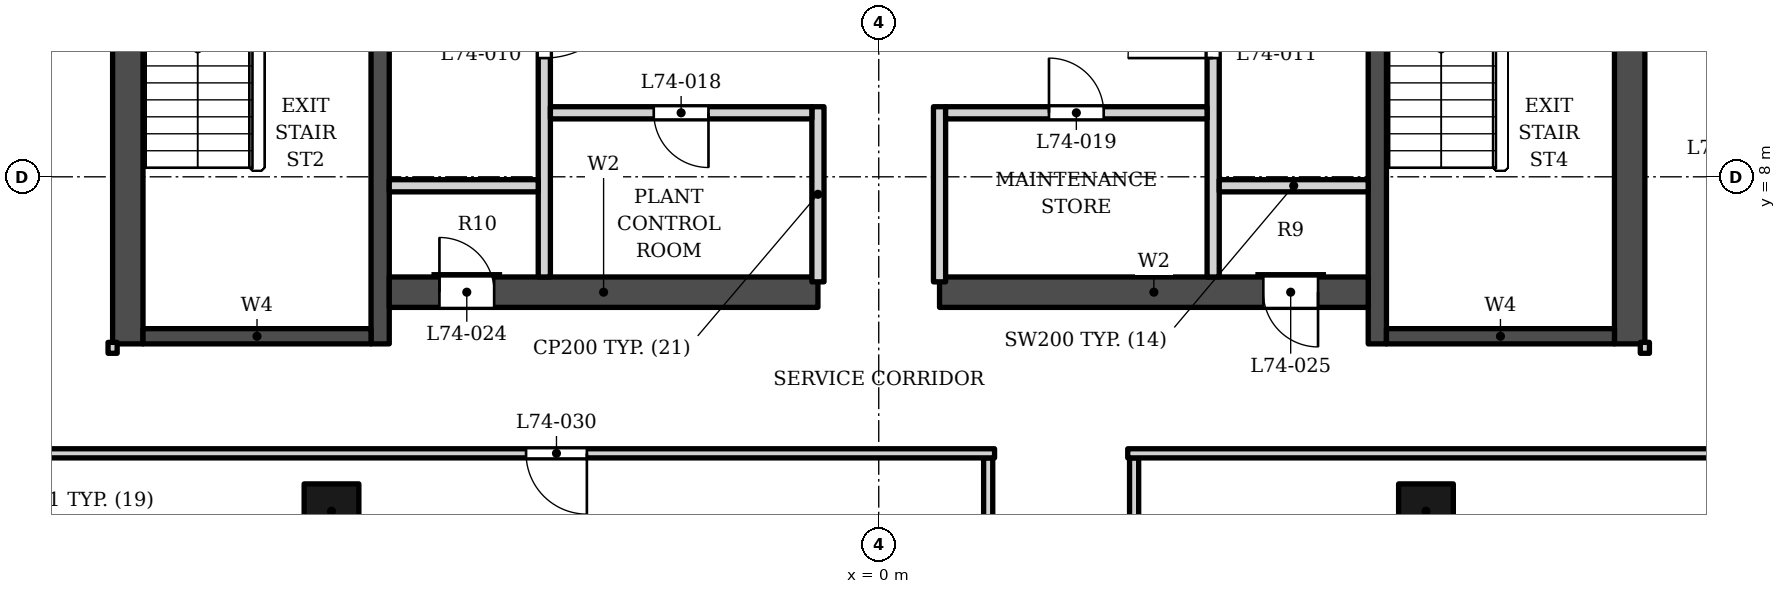
"""IFC4 building model, lengths in metres.
Left out: names, types, materials, properties, quantities, classifications, styles, units other than length and angle.
Written with IfcOpenShell. Run it as: python <this file> out.ifc"""

import sys

from ifc_helpers import new_model, si_unit, direction, frame, frame_2d, origin, origin_2d, place, context, subcontext, project, spatial, rectangle, extrude, element, fill, save


model = new_model("IFC4")
c1 = context("Model", 3, precision=1e-05, world=origin(), true_north=direction((0.0, 1.0)))
c2 = subcontext(c1, "Body", "Model", "MODEL_VIEW")
j1 = project(units=[si_unit("LENGTHUNIT", "METRE"), si_unit("PLANEANGLEUNIT", "RADIAN")], contexts=[c1])
p1 = place(None, origin())
s1 = spatial("IfcSite", under=j1, at=p1, CompositionType="ELEMENT")
p2 = place(p1, origin())
s2 = spatial("IfcBuilding", under=s1, at=p2, CompositionType="ELEMENT")
p3 = place(p2, frame((0.0, 0.0, 315.5)))
s3 = spatial("IfcBuildingStorey", under=s2, at=p3, CompositionType="ELEMENT", Elevation=315.5)
p4 = place(p3, frame((-12.35, 5.253, 0.0), z_axis=(0.0, 0.0, 1.0), x_axis=(0.0, 1.0, 0.0)))
e1 = element("IfcWall", 1, at=p4, inside=s3, PredefinedType="SHEAR", context=c2, shape_type="SweptSolid", body=[
    extrude(rectangle(XDim=13.8, YDim=0.5, at=frame_2d((6.9, 0.0))), origin(), (0.0, 0.0, 1.0), 5.0),
])
p5 = place(p4, frame((7.2, 0.0, 0.0)))
e2 = element("IfcOpeningElement", 2, at=p5, cuts=e1, PredefinedType="OPENING", context=c2, shape_type="SweptSolid", body=[
    extrude(rectangle(XDim=1.2, YDim=2.1, at=frame_2d((0.6, 1.05))), frame((0.0, 0.26, 0.0), z_axis=(0.0, -1.0, 0.0), x_axis=(1.0, 0.0, 0.0)), (0.0, 0.0, 1.0), 0.52),
])
p6 = place(p4, frame((5.15, 0.0, 0.0)))
e3 = element("IfcOpeningElement", 3, at=p6, cuts=e1, PredefinedType="OPENING", context=c2, shape_type="SweptSolid", body=[
    extrude(rectangle(XDim=1.2, YDim=2.1, at=frame_2d((0.6, 1.05))), frame((0.0, 0.26, 0.0), z_axis=(0.0, -1.0, 0.0), x_axis=(1.0, 0.0, 0.0)), (0.0, 0.0, 1.0), 0.52),
])
p7 = place(p3, frame((-8.2, 5.253, 0.0), z_axis=(0.0, 0.0, 1.0), x_axis=(0.0, 1.0, 0.0)))
e4 = element("IfcWall", 4, at=p7, inside=s3, PredefinedType="SHEAR", context=c2, shape_type="SweptSolid", body=[
    extrude(rectangle(XDim=13.3, YDim=0.3, at=frame_2d((6.65, 0.0))), origin(), (0.0, 0.0, 1.0), 5.0),
])
p8 = place(p7, frame((7.1, 0.0, 0.0)))
e5 = element("IfcOpeningElement", 5, at=p8, cuts=e4, PredefinedType="OPENING", context=c2, shape_type="SweptSolid", body=[
    extrude(rectangle(XDim=1.4, YDim=2.1, at=frame_2d((0.7, 1.05))), frame((0.0, 0.16, 0.0), z_axis=(0.0, -1.0, 0.0), x_axis=(1.0, 0.0, 0.0)), (0.0, 0.0, 1.0), 0.32),
])
p9 = place(p7, frame((5.05, 0.0, 0.0)))
e6 = element("IfcOpeningElement", 6, at=p9, cuts=e4, PredefinedType="OPENING", context=c2, shape_type="SweptSolid", body=[
    extrude(rectangle(XDim=1.4, YDim=2.1, at=frame_2d((0.7, 1.05))), frame((0.0, 0.16, 0.0), z_axis=(0.0, -1.0, 0.0), x_axis=(1.0, 0.0, 0.0)), (0.0, 0.0, 1.0), 0.32),
])
p10 = place(p3, frame((-12.1, 5.378, 0.0), z_axis=(0.0, 0.0, 1.0), x_axis=(1.0, 0.0, 0.0)))
e7 = element("IfcWall", 7, at=p10, inside=s3, PredefinedType="SHEAR", context=c2, shape_type="SweptSolid", body=[
    extrude(rectangle(XDim=3.75, YDim=0.25, at=frame_2d((1.875, 0.0))), origin(), (0.0, 0.0, 1.0), 5.0),
])
p11 = place(p3, frame((12.35, 5.253, 0.0), z_axis=(0.0, 0.0, 1.0), x_axis=(0.0, 1.0, 0.0)))
e8 = element("IfcWall", 8, at=p11, inside=s3, PredefinedType="SHEAR", context=c2, shape_type="SweptSolid", body=[
    extrude(rectangle(XDim=13.8, YDim=0.5, at=frame_2d((6.9, 0.0))), origin(), (0.0, 0.0, 1.0), 5.0),
])
p12 = place(p11, frame((7.2, 0.0, 0.0)))
e9 = element("IfcOpeningElement", 9, at=p12, cuts=e8, PredefinedType="OPENING", context=c2, shape_type="SweptSolid", body=[
    extrude(rectangle(XDim=1.2, YDim=2.1, at=frame_2d((0.6, 1.05))), frame((0.0, 0.26, 0.0), z_axis=(0.0, -1.0, 0.0), x_axis=(1.0, 0.0, 0.0)), (0.0, 0.0, 1.0), 0.52),
])
p13 = place(p11, frame((5.15, 0.0, 0.0)))
e10 = element("IfcOpeningElement", 10, at=p13, cuts=e8, PredefinedType="OPENING", context=c2, shape_type="SweptSolid", body=[
    extrude(rectangle(XDim=1.2, YDim=2.1, at=frame_2d((0.6, 1.05))), frame((0.0, 0.26, 0.0), z_axis=(0.0, -1.0, 0.0), x_axis=(1.0, 0.0, 0.0)), (0.0, 0.0, 1.0), 0.52),
])
p14 = place(p3, frame((8.2, 5.253, 0.0), z_axis=(0.0, 0.0, 1.0), x_axis=(0.0, 1.0, 0.0)))
e11 = element("IfcWall", 11, at=p14, inside=s3, PredefinedType="SHEAR", context=c2, shape_type="SweptSolid", body=[
    extrude(rectangle(XDim=13.3, YDim=0.3, at=frame_2d((6.65, 0.0))), origin(), (0.0, 0.0, 1.0), 5.0),
])
p15 = place(p14, frame((7.1, 0.0, 0.0)))
e12 = element("IfcOpeningElement", 12, at=p15, cuts=e11, PredefinedType="OPENING", context=c2, shape_type="SweptSolid", body=[
    extrude(rectangle(XDim=1.4, YDim=2.1, at=frame_2d((0.7, 1.05))), frame((0.0, 0.16, 0.0), z_axis=(0.0, -1.0, 0.0), x_axis=(1.0, 0.0, 0.0)), (0.0, 0.0, 1.0), 0.32),
])
p16 = place(p14, frame((5.05, 0.0, 0.0)))
e13 = element("IfcOpeningElement", 13, at=p16, cuts=e11, PredefinedType="OPENING", context=c2, shape_type="SweptSolid", body=[
    extrude(rectangle(XDim=1.4, YDim=2.1, at=frame_2d((0.7, 1.05))), frame((0.0, 0.16, 0.0), z_axis=(0.0, -1.0, 0.0), x_axis=(1.0, 0.0, 0.0)), (0.0, 0.0, 1.0), 0.32),
])
p17 = place(p3, frame((8.35, 5.378, 0.0), z_axis=(0.0, 0.0, 1.0), x_axis=(1.0, 0.0, 0.0)))
e14 = element("IfcWall", 14, at=p17, inside=s3, PredefinedType="SHEAR", context=c2, shape_type="SweptSolid", body=[
    extrude(rectangle(XDim=3.75, YDim=0.25, at=frame_2d((1.875, 0.0))), origin(), (0.0, 0.0, 1.0), 5.0),
])
p18 = place(p3, frame((-8.05, 6.103, 0.0), z_axis=(0.0, 0.0, 1.0), x_axis=(1.0, 0.0, 0.0)))
e15 = element("IfcWall", 15, at=p18, inside=s3, PredefinedType="SHEAR", context=c2, shape_type="SweptSolid", body=[
    extrude(rectangle(XDim=7.05, YDim=0.5, at=frame_2d((3.525, 0.0))), origin(), (0.0, 0.0, 1.0), 5.0),
])
p19 = place(p18, frame((0.825, 0.0, 0.0)))
e16 = element("IfcOpeningElement", 16, at=p19, cuts=e15, PredefinedType="OPENING", context=c2, shape_type="SweptSolid", body=[
    extrude(rectangle(XDim=0.9, YDim=2.1, at=frame_2d((0.45, 1.05))), frame((0.0, 0.26, 0.0), z_axis=(0.0, -1.0, 0.0), x_axis=(1.0, 0.0, 0.0)), (0.0, 0.0, 1.0), 0.52),
])
p20 = place(p3, frame((1.0, 6.103, 0.0), z_axis=(0.0, 0.0, 1.0), x_axis=(1.0, 0.0, 0.0)))
e17 = element("IfcWall", 17, at=p20, inside=s3, PredefinedType="SHEAR", context=c2, shape_type="SweptSolid", body=[
    extrude(rectangle(XDim=7.05, YDim=0.5, at=frame_2d((3.525, 0.0))), origin(), (0.0, 0.0, 1.0), 5.0),
])
p21 = place(p20, frame((5.325, 0.0, 0.0)))
e18 = element("IfcOpeningElement", 18, at=p21, cuts=e17, PredefinedType="OPENING", context=c2, shape_type="SweptSolid", body=[
    extrude(rectangle(XDim=0.9, YDim=2.1, at=frame_2d((0.45, 1.05))), frame((0.0, 0.26, 0.0), z_axis=(0.0, -1.0, 0.0), x_axis=(1.0, 0.0, 0.0)), (0.0, 0.0, 1.0), 0.52),
])
for number, where, z_axis, x_axis in (
    (19, (-9.0, 2.5, 0.0), (0.0, 0.0, 1.0), (1.0, 0.0, 0.0)),
    (20, (9.0, 2.5, 0.0), (0.0, 0.0, 1.0), (1.0, 0.0, 0.0)),
):
    element("IfcColumn", number, at=place(p3, frame(where, z_axis=z_axis, x_axis=x_axis)), inside=s3, PredefinedType="COLUMN", context=c2, shape_type="SweptSolid", body=[
        extrude(rectangle(XDim=0.9, YDim=0.9, at=origin_2d()), origin(), (0.0, 0.0, 1.0), 5.0),
    ])
for number, where, z_axis, x_axis in (
    (21, (-1.0, 6.273, 0.0), (0.0, 0.0, 1.0), (0.0, 1.0, 0.0)),
    (22, (1.0, 6.273, 0.0), (0.0, 0.0, 1.0), (0.0, 1.0, 0.0)),
):
    element("IfcWall", number, at=place(p3, frame(where, z_axis=z_axis, x_axis=x_axis)), inside=s3, PredefinedType="PARTITIONING", context=c2, shape_type="SweptSolid", body=[
        extrude(rectangle(XDim=2.88, YDim=0.2, at=frame_2d((1.44, 0.0))), origin(), (0.0, 0.0, 1.0), 4.8),
    ])
p22 = place(p3, frame((-5.5, 6.353, 0.0), z_axis=(0.0, 0.0, 1.0), x_axis=(0.0, 1.0, 0.0)))
e23 = element("IfcWall", 23, at=p22, inside=s3, PredefinedType="SOLIDWALL", context=c2, shape_type="SweptSolid", body=[
    extrude(rectangle(XDim=7.85, YDim=0.2, at=frame_2d((3.925, 0.0))), origin(), (0.0, 0.0, 1.0), 4.8),
])
p23 = place(p22, frame((3.6, 0.0, 0.0)))
e24 = element("IfcOpeningElement", 24, at=p23, cuts=e23, PredefinedType="OPENING", context=c2, shape_type="SweptSolid", body=[
    extrude(rectangle(XDim=1.4, YDim=2.1, at=frame_2d((0.7, 1.05))), frame((0.0, 0.11, 0.0), z_axis=(0.0, -1.0, 0.0), x_axis=(1.0, 0.0, 0.0)), (0.0, 0.0, 1.0), 0.22),
])
p24 = place(p3, frame((5.5, 6.353, 0.0), z_axis=(0.0, 0.0, 1.0), x_axis=(0.0, 1.0, 0.0)))
e25 = element("IfcWall", 25, at=p24, inside=s3, PredefinedType="SOLIDWALL", context=c2, shape_type="SweptSolid", body=[
    extrude(rectangle(XDim=7.85, YDim=0.2, at=frame_2d((3.925, 0.0))), origin(), (0.0, 0.0, 1.0), 4.8),
])
p25 = place(p24, frame((3.6, 0.0, 0.0)))
e26 = element("IfcOpeningElement", 26, at=p25, cuts=e25, PredefinedType="OPENING", context=c2, shape_type="SweptSolid", body=[
    extrude(rectangle(XDim=1.4, YDim=2.1, at=frame_2d((0.7, 1.05))), frame((0.0, 0.11, 0.0), z_axis=(0.0, -1.0, 0.0), x_axis=(1.0, 0.0, 0.0)), (0.0, 0.0, 1.0), 0.22),
])
for number, where, z_axis, x_axis in (
    (27, (-8.05, 7.853, 0.0), (0.0, 0.0, 1.0), (1.0, 0.0, 0.0)),
    (28, (5.6, 7.853, 0.0), (0.0, 0.0, 1.0), (1.0, 0.0, 0.0)),
):
    element("IfcWall", number, at=place(p3, frame(where, z_axis=z_axis, x_axis=x_axis)), inside=s3, PredefinedType="SOLIDWALL", context=c2, shape_type="SweptSolid", body=[
        extrude(rectangle(XDim=2.45, YDim=0.2, at=frame_2d((1.225, 0.0))), origin(), (0.0, 0.0, 1.0), 4.8),
    ])
p26 = place(p3, frame((-5.4, 9.052, 0.0), z_axis=(0.0, 0.0, 1.0), x_axis=(1.0, 0.0, 0.0)))
e29 = element("IfcWall", 29, at=p26, inside=s3, PredefinedType="PARTITIONING", context=c2, shape_type="SweptSolid", body=[
    extrude(rectangle(XDim=4.3, YDim=0.2, at=frame_2d((2.15, 0.0))), origin(), (0.0, 0.0, 1.0), 4.8),
])
p27 = place(p26, frame((1.7, 0.0, 0.0)))
e30 = element("IfcOpeningElement", 30, at=p27, cuts=e29, PredefinedType="OPENING", context=c2, shape_type="SweptSolid", body=[
    extrude(rectangle(XDim=0.9, YDim=2.1, at=frame_2d((0.45, 1.05))), frame((0.0, 0.11, 0.0), z_axis=(0.0, -1.0, 0.0), x_axis=(1.0, 0.0, 0.0)), (0.0, 0.0, 1.0), 0.22),
])
p28 = place(p3, frame((1.1, 9.052, 0.0), z_axis=(0.0, 0.0, 1.0), x_axis=(1.0, 0.0, 0.0)))
e31 = element("IfcWall", 31, at=p28, inside=s3, PredefinedType="PARTITIONING", context=c2, shape_type="SweptSolid", body=[
    extrude(rectangle(XDim=4.3, YDim=0.2, at=frame_2d((2.15, 0.0))), origin(), (0.0, 0.0, 1.0), 4.8),
])
p29 = place(p28, frame((1.7, 0.0, 0.0)))
e32 = element("IfcOpeningElement", 32, at=p29, cuts=e31, PredefinedType="OPENING", context=c2, shape_type="SweptSolid", body=[
    extrude(rectangle(XDim=0.9, YDim=2.1, at=frame_2d((0.45, 1.05))), frame((0.0, 0.11, 0.0), z_axis=(0.0, -1.0, 0.0), x_axis=(1.0, 0.0, 0.0)), (0.0, 0.0, 1.0), 0.22),
])
p30 = place(p3, frame((1.8, -6.472, 0.0), z_axis=(0.0, 0.0, 1.0), x_axis=(0.0, 1.0, 0.0)))
e33 = element("IfcWall", 33, at=p30, inside=s3, PredefinedType="PARTITIONING", context=c2, shape_type="SweptSolid", body=[
    extrude(rectangle(XDim=9.85, YDim=0.15, at=frame_2d((4.925, 0.0))), origin(), (0.0, 0.0, 1.0), 4.8),
])
p31 = place(p3, frame((4.2, -6.472, 0.0), z_axis=(0.0, 0.0, 1.0), x_axis=(0.0, 1.0, 0.0)))
e34 = element("IfcWall", 34, at=p31, inside=s3, PredefinedType="PARTITIONING", context=c2, shape_type="SweptSolid", body=[
    extrude(rectangle(XDim=9.85, YDim=0.15, at=frame_2d((4.925, 0.0))), origin(), (0.0, 0.0, 1.0), 4.8),
])
p32 = place(p31, frame((4.325, 0.0, 0.0)))
e35 = element("IfcOpeningElement", 35, at=p32, cuts=e34, PredefinedType="OPENING", context=c2, shape_type="SweptSolid", body=[
    extrude(rectangle(XDim=1.0, YDim=2.1, at=frame_2d((0.5, 1.05))), frame((0.0, 0.085, 0.0), z_axis=(0.0, -1.0, 0.0), x_axis=(1.0, 0.0, 0.0)), (0.0, 0.0, 1.0), 0.17),
])
p33 = place(p3, frame((-15.85, 3.453, 0.0), z_axis=(0.0, 0.0, 1.0), x_axis=(1.0, 0.0, 0.0)))
e36 = element("IfcWall", 36, at=p33, inside=s3, PredefinedType="PARTITIONING", context=c2, shape_type="SweptSolid", body=[
    extrude(rectangle(XDim=17.755, YDim=0.15, at=frame_2d((8.877, 0.0))), origin(), (0.0, 0.0, 1.0), 4.1),
])
p34 = place(p33, frame((10.05, 0.0, 0.0)))
e37 = element("IfcOpeningElement", 37, at=p34, cuts=e36, PredefinedType="OPENING", context=c2, shape_type="SweptSolid", body=[
    extrude(rectangle(XDim=1.0, YDim=2.1, at=frame_2d((0.5, 1.05))), frame((0.0, 0.085, 0.0), z_axis=(0.0, -1.0, 0.0), x_axis=(1.0, 0.0, 0.0)), (0.0, 0.0, 1.0), 0.17),
])
p35 = place(p3, frame((4.095, 3.453, 0.0), z_axis=(0.0, 0.0, 1.0), x_axis=(1.0, 0.0, 0.0)))
e38 = element("IfcWall", 38, at=p35, inside=s3, PredefinedType="PARTITIONING", context=c2, shape_type="SweptSolid", body=[
    extrude(rectangle(XDim=13.627, YDim=0.15, at=frame_2d((6.813, 0.0))), origin(), (0.0, 0.0, 1.0), 4.1),
])
for number, where, z_axis, x_axis in (
    (39, (-12.6, 5.098, 0.0), (0.0, 0.0, 1.0), (0.0, 1.0, 0.0)),
    (40, (12.6, 5.098, 0.0), (0.0, 0.0, 1.0), (0.0, 1.0, 0.0)),
):
    element("IfcWall", number, at=place(p3, frame(where, z_axis=z_axis, x_axis=x_axis)), inside=s3, PredefinedType="PARTITIONING", context=c2, shape_type="SweptSolid", body=[
        extrude(rectangle(XDim=0.18, YDim=0.15, at=frame_2d((0.09, 0.0))), origin(), (0.0, 0.0, 1.0), 4.8),
    ])
p36 = place(p23, origin())
e41 = element("IfcDoor", 41, at=p36, inside=s3, OperationType="SINGLE_SWING_RIGHT", PredefinedType="DOOR", context=c2, shape_type="SweptSolid", body=[
    extrude(rectangle(XDim=1.4, YDim=2.1, at=frame_2d((0.7, 1.05))), frame((0.0, 0.025, 0.0), z_axis=(0.0, -1.0, 0.0), x_axis=(1.0, 0.0, 0.0)), (0.0, 0.0, 1.0), 0.05),
])
fill(e24, e41)
p37 = place(p25, origin())
e42 = element("IfcDoor", 42, at=p37, inside=s3, OperationType="SINGLE_SWING_LEFT", PredefinedType="DOOR", context=c2, shape_type="SweptSolid", body=[
    extrude(rectangle(XDim=1.4, YDim=2.1, at=frame_2d((0.7, 1.05))), frame((0.0, 0.025, 0.0), z_axis=(0.0, -1.0, 0.0), x_axis=(1.0, 0.0, 0.0)), (0.0, 0.0, 1.0), 0.05),
])
fill(e26, e42)
p38 = place(p27, origin())
e43 = element("IfcDoor", 43, at=p38, inside=s3, OperationType="SINGLE_SWING_RIGHT", PredefinedType="DOOR", context=c2, shape_type="SweptSolid", body=[
    extrude(rectangle(XDim=0.9, YDim=2.1, at=frame_2d((0.45, 1.05))), frame((0.0, 0.025, 0.0), z_axis=(0.0, -1.0, 0.0), x_axis=(1.0, 0.0, 0.0)), (0.0, 0.0, 1.0), 0.05),
])
fill(e30, e43)
p39 = place(p29, origin())
e44 = element("IfcDoor", 44, at=p39, inside=s3, OperationType="SINGLE_SWING_LEFT", PredefinedType="DOOR", context=c2, shape_type="SweptSolid", body=[
    extrude(rectangle(XDim=0.9, YDim=2.1, at=frame_2d((0.45, 1.05))), frame((0.0, 0.025, 0.0), z_axis=(0.0, -1.0, 0.0), x_axis=(1.0, 0.0, 0.0)), (0.0, 0.0, 1.0), 0.05),
])
fill(e32, e44)
p40 = place(p19, origin())
e45 = element("IfcDoor", 45, at=p40, inside=s3, OperationType="SINGLE_SWING_LEFT", PredefinedType="DOOR", context=c2, shape_type="SweptSolid", body=[
    extrude(rectangle(XDim=0.9, YDim=2.1, at=frame_2d((0.45, 1.05))), frame((0.0, 0.025, 0.0), z_axis=(0.0, -1.0, 0.0), x_axis=(1.0, 0.0, 0.0)), (0.0, 0.0, 1.0), 0.05),
])
fill(e16, e45)
p41 = place(p21, origin())
e46 = element("IfcDoor", 46, at=p41, inside=s3, OperationType="SINGLE_SWING_RIGHT", PredefinedType="DOOR", context=c2, shape_type="SweptSolid", body=[
    extrude(rectangle(XDim=0.9, YDim=2.1, at=frame_2d((0.45, 1.05))), frame((0.0, 0.025, 0.0), z_axis=(0.0, -1.0, 0.0), x_axis=(1.0, 0.0, 0.0)), (0.0, 0.0, 1.0), 0.05),
])
fill(e18, e46)
p42 = place(p34, origin())
e47 = element("IfcDoor", 47, at=p42, inside=s3, OperationType="SINGLE_SWING_RIGHT", PredefinedType="DOOR", context=c2, shape_type="SweptSolid", body=[
    extrude(rectangle(XDim=1.0, YDim=2.1, at=frame_2d((0.5, 1.05))), frame((0.0, 0.025, 0.0), z_axis=(0.0, -1.0, 0.0), x_axis=(1.0, 0.0, 0.0)), (0.0, 0.0, 1.0), 0.05),
])
fill(e37, e47)
save(model, sys.argv[1])
